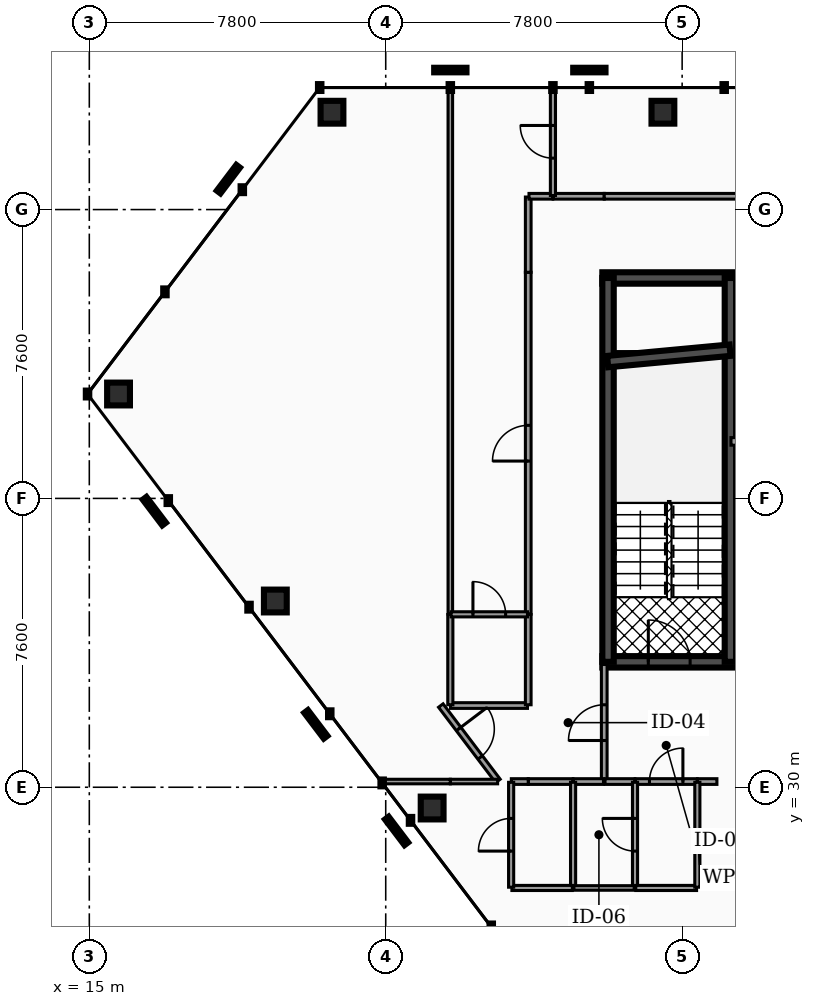
"""IFC4 building model, lengths in metres.
Left out: names, types, materials, properties, quantities, classifications, styles, units other than length and angle.
Written with IfcOpenShell. Run it as: python <this file> out.ifc"""

import sys

from ifc_helpers import new_model, si_unit, direction, frame, frame_2d, origin, origin_2d, place, context, subcontext, project, spatial, rectangle, hollow_rectangle, extrude, element, fill, save


model = new_model("IFC4")
c1 = context("Model", 3, precision=1e-05, world=origin(), true_north=direction((0.0, 1.0)))
c2 = subcontext(c1, "Body", "Model", "MODEL_VIEW")
j1 = project(units=[si_unit("LENGTHUNIT", "METRE"), si_unit("PLANEANGLEUNIT", "RADIAN")], contexts=[c1])
p1 = place(None, origin())
s1 = spatial("IfcSite", under=j1, at=p1, CompositionType="ELEMENT")
p2 = place(p1, origin())
s2 = spatial("IfcBuilding", under=s1, at=p2, CompositionType="ELEMENT")
p3 = place(p2, frame((0.0, 0.0, 208.76)))
s3 = spatial("IfcBuildingStorey", under=s2, at=p3, CompositionType="ELEMENT", Elevation=208.76)
p4 = place(p3, frame((28.5, 43.4, 0.0), z_axis=(0.0, 0.0, 1.0), x_axis=(1.0, 0.0, 0.0)))
e1 = element("IfcWall", 1, at=p4, inside=s3, PredefinedType="SHEAR", context=c2, shape_type="SweptSolid", body=[
    extrude(rectangle(XDim=19.86, YDim=0.3, at=frame_2d((9.93, 0.0))), origin(), (0.0, 0.0, 1.0), 3.18),
])
p5 = place(p3, frame((28.5, 33.3, 0.0), z_axis=(0.0, 0.0, 1.0), x_axis=(1.0, 0.0, 0.0)))
e2 = element("IfcWall", 2, at=p5, inside=s3, PredefinedType="SHEAR", context=c2, shape_type="SweptSolid", body=[
    extrude(rectangle(XDim=19.86, YDim=0.3, at=frame_2d((9.93, 0.0))), origin(), (0.0, 0.0, 1.0), 3.18),
])
p6 = place(p5, frame((3.93, 0.0, 0.0)))
e3 = element("IfcOpeningElement", 3, at=p6, cuts=e2, PredefinedType="OPENING", context=c2, shape_type="SweptSolid", body=[
    extrude(rectangle(XDim=1.1, YDim=2.15, at=frame_2d((0.55, 1.075))), frame((0.0, 0.16, 0.0), z_axis=(0.0, -1.0, 0.0), x_axis=(1.0, 0.0, 0.0)), (0.0, 0.0, 1.0), 0.32),
])
p7 = place(p5, frame((14.77, 0.0, 0.0)))
e4 = element("IfcOpeningElement", 4, at=p7, cuts=e2, PredefinedType="OPENING", context=c2, shape_type="SweptSolid", body=[
    extrude(rectangle(XDim=1.1, YDim=2.15, at=frame_2d((0.55, 1.075))), frame((0.0, 0.16, 0.0), z_axis=(0.0, -1.0, 0.0), x_axis=(1.0, 0.0, 0.0)), (0.0, 0.0, 1.0), 0.32),
])
p8 = place(p5, frame((11.25, 0.0, 0.0)))
e5 = element("IfcOpeningElement", 5, at=p8, cuts=e2, PredefinedType="OPENING", context=c2, shape_type="SweptSolid", body=[
    extrude(rectangle(XDim=1.0, YDim=2.1, at=frame_2d((0.5, 1.05))), frame((0.0, 0.16, 0.0), z_axis=(0.0, -1.0, 0.0), x_axis=(1.0, 0.0, 0.0)), (0.0, 0.0, 1.0), 0.32),
])
p9 = place(p5, frame((12.95, 0.0, 0.0)))
e6 = element("IfcOpeningElement", 6, at=p9, cuts=e2, PredefinedType="OPENING", context=c2, shape_type="SweptSolid", body=[
    extrude(rectangle(XDim=1.0, YDim=2.1, at=frame_2d((0.5, 1.05))), frame((0.0, 0.16, 0.0), z_axis=(0.0, -1.0, 0.0), x_axis=(1.0, 0.0, 0.0)), (0.0, 0.0, 1.0), 0.32),
])
p10 = place(p5, frame((5.85, 0.0, 0.0)))
e7 = element("IfcOpeningElement", 7, at=p10, cuts=e2, PredefinedType="OPENING", context=c2, shape_type="SweptSolid", body=[
    extrude(rectangle(XDim=1.0, YDim=2.1, at=frame_2d((0.5, 1.05))), frame((0.0, 0.16, 0.0), z_axis=(0.0, -1.0, 0.0), x_axis=(1.0, 0.0, 0.0)), (0.0, 0.0, 1.0), 0.32),
])
p11 = place(p5, frame((1.21, 0.0, 0.0)))
e8 = element("IfcOpeningElement", 8, at=p11, cuts=e2, PredefinedType="OPENING", context=c2, shape_type="SweptSolid", body=[
    extrude(rectangle(XDim=1.1, YDim=2.2, at=frame_2d((0.55, 1.1))), frame((0.0, 0.16, 0.0), z_axis=(0.0, -1.0, 0.0), x_axis=(1.0, 0.0, 0.0)), (0.0, 0.0, 1.0), 0.32),
])
p12 = place(p5, frame((9.34, 0.0, 0.0)))
e9 = element("IfcOpeningElement", 9, at=p12, cuts=e2, PredefinedType="OPENING", context=c2, shape_type="SweptSolid", body=[
    extrude(rectangle(XDim=1.12, YDim=2.05, at=frame_2d((0.56, 1.025))), frame((0.0, 0.16, 0.0), z_axis=(0.0, -1.0, 0.0), x_axis=(1.0, 0.0, 0.0)), (0.0, 0.0, 1.0), 0.32),
])
p13 = place(p5, frame((17.55, 0.0, 0.0)))
e10 = element("IfcOpeningElement", 10, at=p13, cuts=e2, PredefinedType="OPENING", context=c2, shape_type="SweptSolid", body=[
    extrude(rectangle(XDim=1.1, YDim=2.2, at=frame_2d((0.55, 1.1))), frame((0.0, 0.16, 0.0), z_axis=(0.0, -1.0, 0.0), x_axis=(1.0, 0.0, 0.0)), (0.0, 0.0, 1.0), 0.32),
])
for number, where, z_axis, x_axis in (
    (11, (28.65, 33.3, 0.0), (0.0, 0.0, 1.0), (0.0, 1.0, 0.0)),
    (12, (31.87, 33.3, 0.0), (0.0, 0.0, 1.0), (0.0, 1.0, 0.0)),
):
    element("IfcWall", number, at=place(p3, frame(where, z_axis=z_axis, x_axis=x_axis)), inside=s3, PredefinedType="SHEAR", context=c2, shape_type="SweptSolid", body=[
        extrude(rectangle(XDim=10.1, YDim=0.3, at=frame_2d((5.05, 0.0))), origin(), (0.0, 0.0, 1.0), 3.18),
    ])
p14 = place(p3, frame((28.64, 41.2, 0.0), z_axis=(0.0, 0.0, 1.0), x_axis=(0.995687118776, 0.092774789157, 0.0)))
e13 = element("IfcWall", 13, at=p14, inside=s3, PredefinedType="SHEAR", context=c2, shape_type="SweptSolid", body=[
    extrude(rectangle(XDim=3.234, YDim=0.3, at=frame_2d((1.617, 0.0))), origin(), (0.0, 0.0, 1.0), 3.18),
])
for number, where, z_axis, x_axis in (
    (14, (30.094, 47.761, 0.0), (0.0, 0.0, 1.0), (1.0, 0.0, 0.0)),
    (15, (21.386, 47.761, 0.0), (0.0, 0.0, 1.0), (1.0, 0.0, 0.0)),
    (16, (15.769, 40.347, 0.0), (0.0, 0.0, 1.0), (1.0, 0.0, 0.0)),
    (17, (19.895, 34.9, 0.0), (0.0, 0.0, 1.0), (1.0, 0.0, 0.0)),
    (18, (24.021, 29.454, 0.0), (0.0, 0.0, 1.0), (1.0, 0.0, 0.0)),
):
    element("IfcColumn", number, at=place(p3, frame(where, z_axis=z_axis, x_axis=x_axis)), inside=s3, PredefinedType="COLUMN", context=c2, shape_type="SweptSolid", body=[
        extrude(hollow_rectangle(XDim=0.6, YDim=0.6, WallThickness=0.03, at=origin_2d()), origin(), (0.0, 0.0, 1.0), 3.18),
    ])
p15 = place(p3, frame((31.885, 39.1, 0.0), z_axis=(0.0, 0.0, 1.0), x_axis=(1.0, 0.0, 0.0)))
e19 = element("IfcWall", 19, at=p15, inside=s3, PredefinedType="PARTITIONING", context=c2, shape_type="SweptSolid", body=[
    extrude(rectangle(XDim=5.645, YDim=0.2, at=frame_2d((2.823, 0.0))), origin(), (0.0, 0.0, 1.0), 2.235),
])
p16 = place(p3, frame((28.55, 30.17, 0.0), z_axis=(0.0, 0.0, 1.0), x_axis=(0.0, 1.0, 0.0)))
e20 = element("IfcWall", 20, at=p16, inside=s3, PredefinedType="PARTITIONING", context=c2, shape_type="SweptSolid", body=[
    extrude(rectangle(XDim=3.06, YDim=0.15, at=frame_2d((1.53, 0.0))), origin(), (0.0, 0.0, 1.0), 2.235),
])
p17 = place(p16, frame((1.06, 0.0, 0.0)))
e21 = element("IfcOpeningElement", 21, at=p17, cuts=e20, PredefinedType="OPENING", context=c2, shape_type="SweptSolid", body=[
    extrude(rectangle(XDim=0.94, YDim=2.05, at=frame_2d((0.47, 1.025))), frame((0.0, 0.085, 0.0), z_axis=(0.0, -1.0, 0.0), x_axis=(1.0, 0.0, 0.0)), (0.0, 0.0, 1.0), 0.17),
])
p18 = place(p3, frame((29.365, 30.15, 0.0), z_axis=(0.0, 0.0, 1.0), x_axis=(1.0, 0.0, 0.0)))
e22 = element("IfcWall", 22, at=p18, inside=s3, PredefinedType="PARTITIONING", context=c2, shape_type="SweptSolid", body=[
    extrude(rectangle(XDim=1.63, YDim=0.15, at=frame_2d((0.815, 0.0))), origin(), (0.0, 0.0, 1.0), 2.235),
])
p19 = place(p18, frame((0.375, 0.0, 0.0)))
e23 = element("IfcOpeningElement", 23, at=p19, cuts=e22, PredefinedType="OPENING", context=c2, shape_type="SweptSolid", body=[
    extrude(rectangle(XDim=0.88, YDim=2.05, at=frame_2d((0.44, 1.025))), frame((0.0, 0.085, 0.0), z_axis=(0.0, -1.0, 0.0), x_axis=(1.0, 0.0, 0.0)), (0.0, 0.0, 1.0), 0.17),
])
p20 = place(p3, frame((28.57, 30.15, 0.0), z_axis=(0.0, 0.0, 1.0), x_axis=(1.0, 0.0, 0.0)))
e24 = element("IfcWall", 24, at=p20, inside=s3, PredefinedType="PARTITIONING", context=c2, shape_type="SweptSolid", body=[
    extrude(rectangle(XDim=0.785, YDim=0.15, at=frame_2d((0.393, 0.0))), origin(), (0.0, 0.0, 1.0), 2.235),
])
p21 = place(p3, frame((31.005, 30.15, 0.0), z_axis=(0.0, 0.0, 1.0), x_axis=(1.0, 0.0, 0.0)))
e25 = element("IfcWall", 25, at=p21, inside=s3, PredefinedType="PARTITIONING", context=c2, shape_type="SweptSolid", body=[
    extrude(rectangle(XDim=0.51, YDim=0.15, at=frame_2d((0.255, 0.0))), origin(), (0.0, 0.0, 1.0), 2.235),
])
p22 = place(p3, frame((26.55, 30.15, 0.0), z_axis=(0.0, 0.0, 1.0), x_axis=(1.0, 0.0, 0.0)))
e26 = element("IfcWall", 26, at=p22, inside=s3, PredefinedType="PARTITIONING", context=c2, shape_type="SweptSolid", body=[
    extrude(rectangle(XDim=1.175, YDim=0.15, at=frame_2d((0.587, 0.0))), origin(), (0.0, 0.0, 1.0), 2.235),
])
p23 = place(p3, frame((26.105, 30.15, 0.0), z_axis=(0.0, 0.0, 1.0), x_axis=(1.0, 0.0, 0.0)))
e27 = element("IfcWall", 27, at=p23, inside=s3, PredefinedType="PARTITIONING", context=c2, shape_type="SweptSolid", body=[
    extrude(rectangle(XDim=0.445, YDim=0.15, at=frame_2d((0.223, 0.0))), origin(), (0.0, 0.0, 1.0), 2.235),
])
p24 = place(p3, frame((27.735, 30.15, 0.0), z_axis=(0.0, 0.0, 1.0), x_axis=(1.0, 0.0, 0.0)))
e28 = element("IfcWall", 28, at=p24, inside=s3, PredefinedType="PARTITIONING", context=c2, shape_type="SweptSolid", body=[
    extrude(rectangle(XDim=0.795, YDim=0.15, at=frame_2d((0.397, 0.0))), origin(), (0.0, 0.0, 1.0), 2.235),
])
p25 = place(p3, frame((24.25, 32.15, 0.0), z_axis=(0.0, 0.0, 1.0), x_axis=(0.60385391082, -0.797095009637, 0.0)))
e29 = element("IfcWall", 29, at=p25, inside=s3, PredefinedType="PARTITIONING", context=c2, shape_type="SweptSolid", body=[
    extrude(rectangle(XDim=2.489, YDim=0.15, at=frame_2d((1.245, 0.0))), origin(), (0.0, 0.0, 1.0), 2.235),
])
p26 = place(p25, frame((0.775, 0.0, 0.0)))
e30 = element("IfcOpeningElement", 30, at=p26, cuts=e29, PredefinedType="OPENING", context=c2, shape_type="SweptSolid", body=[
    extrude(rectangle(XDim=0.94, YDim=2.05, at=frame_2d((0.47, 1.025))), frame((0.0, 0.085, 0.0), z_axis=(0.0, -1.0, 0.0), x_axis=(1.0, 0.0, 0.0)), (0.0, 0.0, 1.0), 0.17),
])
p27 = place(p3, frame((26.55, 34.555, 0.0), z_axis=(0.0, 0.0, 1.0), x_axis=(0.0, 1.0, 0.0)))
e31 = element("IfcWall", 31, at=p27, inside=s3, PredefinedType="PARTITIONING", context=c2, shape_type="SweptSolid", body=[
    extrude(rectangle(XDim=8.995, YDim=0.15, at=frame_2d((4.498, 0.0))), origin(), (0.0, 0.0, 1.0), 2.235),
])
p28 = place(p27, frame((4.028, 0.0, 0.0)))
e32 = element("IfcOpeningElement", 32, at=p28, cuts=e31, PredefinedType="OPENING", context=c2, shape_type="SweptSolid", body=[
    extrude(rectangle(XDim=0.94, YDim=2.05, at=frame_2d((0.47, 1.025))), frame((0.0, 0.085, 0.0), z_axis=(0.0, -1.0, 0.0), x_axis=(1.0, 0.0, 0.0)), (0.0, 0.0, 1.0), 0.17),
])
p29 = place(p3, frame((26.55, 43.55, 0.0), z_axis=(0.0, 0.0, 1.0), x_axis=(0.0, 1.0, 0.0)))
e33 = element("IfcWall", 33, at=p29, inside=s3, PredefinedType="PARTITIONING", context=c2, shape_type="SweptSolid", body=[
    extrude(rectangle(XDim=1.98, YDim=0.15, at=frame_2d((0.99, 0.0))), origin(), (0.0, 0.0, 1.0), 2.235),
])
p30 = place(p3, frame((26.57, 45.55, 0.0), z_axis=(0.0, 0.0, 1.0), x_axis=(1.0, 0.0, 0.0)))
e34 = element("IfcWall", 34, at=p30, inside=s3, PredefinedType="PARTITIONING", context=c2, shape_type="SweptSolid", body=[
    extrude(rectangle(XDim=0.625, YDim=0.15, at=frame_2d((0.312, 0.0))), origin(), (0.0, 0.0, 1.0), 2.235),
])
p31 = place(p3, frame((27.205, 45.55, 0.0), z_axis=(0.0, 0.0, 1.0), x_axis=(1.0, 0.0, 0.0)))
e35 = element("IfcWall", 35, at=p31, inside=s3, PredefinedType="PARTITIONING", context=c2, shape_type="SweptSolid", body=[
    extrude(rectangle(XDim=1.345, YDim=0.15, at=frame_2d((0.672, 0.0))), origin(), (0.0, 0.0, 1.0), 2.235),
])
p32 = place(p3, frame((28.55, 45.55, 0.0), z_axis=(0.0, 0.0, 1.0), x_axis=(1.0, 0.0, 0.0)))
e36 = element("IfcWall", 36, at=p32, inside=s3, PredefinedType="PARTITIONING", context=c2, shape_type="SweptSolid", body=[
    extrude(rectangle(XDim=4.945, YDim=0.15, at=frame_2d((2.473, 0.0))), origin(), (0.0, 0.0, 1.0), 2.235),
])
p33 = place(p3, frame((24.505, 32.15, 0.0), z_axis=(0.0, 0.0, 1.0), x_axis=(1.0, 0.0, 0.0)))
e37 = element("IfcWall", 37, at=p33, inside=s3, PredefinedType="PARTITIONING", context=c2, shape_type="SweptSolid", body=[
    extrude(rectangle(XDim=2.025, YDim=0.15, at=frame_2d((1.013, 0.0))), origin(), (0.0, 0.0, 1.0), 2.235),
])
p34 = place(p3, frame((26.55, 32.17, 0.0), z_axis=(0.0, 0.0, 1.0), x_axis=(0.0, 1.0, 0.0)))
e38 = element("IfcWall", 38, at=p34, inside=s3, PredefinedType="PARTITIONING", context=c2, shape_type="SweptSolid", body=[
    extrude(rectangle(XDim=2.375, YDim=0.15, at=frame_2d((1.188, 0.0))), origin(), (0.0, 0.0, 1.0), 2.235),
])
p35 = place(p3, frame((29.36, 27.37, 0.0), z_axis=(0.0, 0.0, 1.0), x_axis=(0.0, 1.0, 0.0)))
e39 = element("IfcWall", 39, at=p35, inside=s3, PredefinedType="PARTITIONING", context=c2, shape_type="SweptSolid", body=[
    extrude(rectangle(XDim=2.76, YDim=0.135, at=frame_2d((1.38, 0.0))), origin(), (0.0, 0.0, 1.0), 2.235),
])
p36 = place(p35, frame((0.95, 0.0, 0.0)))
e40 = element("IfcOpeningElement", 40, at=p36, cuts=e39, PredefinedType="OPENING", context=c2, shape_type="SweptSolid", body=[
    extrude(rectangle(XDim=0.86, YDim=2.05, at=frame_2d((0.43, 1.025))), frame((0.0, 0.077, 0.0), z_axis=(0.0, -1.0, 0.0), x_axis=(1.0, 0.0, 0.0)), (0.0, 0.0, 1.0), 0.155),
])
p37 = place(p3, frame((29.38, 27.35, 0.0), z_axis=(0.0, 0.0, 1.0), x_axis=(1.0, 0.0, 0.0)))
e41 = element("IfcWall", 41, at=p37, inside=s3, PredefinedType="PARTITIONING", context=c2, shape_type="SweptSolid", body=[
    extrude(rectangle(XDim=1.6, YDim=0.135, at=frame_2d((0.8, 0.0))), origin(), (0.0, 0.0, 1.0), 2.235),
])
for number, where, z_axis, x_axis in (
    (42, (31.0, 27.37, 0.0), (0.0, 0.0, 1.0), (0.0, 1.0, 0.0)),
    (43, (27.73, 27.37, 0.0), (0.0, 0.0, 1.0), (0.0, 1.0, 0.0)),
):
    element("IfcWall", number, at=place(p3, frame(where, z_axis=z_axis, x_axis=x_axis)), inside=s3, PredefinedType="PARTITIONING", context=c2, shape_type="SweptSolid", body=[
        extrude(rectangle(XDim=2.76, YDim=0.135, at=frame_2d((1.38, 0.0))), origin(), (0.0, 0.0, 1.0), 2.235),
    ])
p38 = place(p3, frame((26.12, 27.35, 0.0), z_axis=(0.0, 0.0, 1.0), x_axis=(1.0, 0.0, 0.0)))
e44 = element("IfcWall", 44, at=p38, inside=s3, PredefinedType="PARTITIONING", context=c2, shape_type="SweptSolid", body=[
    extrude(rectangle(XDim=1.59, YDim=0.135, at=frame_2d((0.795, 0.0))), origin(), (0.0, 0.0, 1.0), 2.235),
])
p39 = place(p3, frame((26.1, 27.37, 0.0), z_axis=(0.0, 0.0, 1.0), x_axis=(0.0, 1.0, 0.0)))
e45 = element("IfcWall", 45, at=p39, inside=s3, PredefinedType="PARTITIONING", context=c2, shape_type="SweptSolid", body=[
    extrude(rectangle(XDim=2.76, YDim=0.135, at=frame_2d((1.38, 0.0))), origin(), (0.0, 0.0, 1.0), 2.235),
])
p40 = place(p39, frame((0.95, 0.0, 0.0)))
e46 = element("IfcOpeningElement", 46, at=p40, cuts=e45, PredefinedType="OPENING", context=c2, shape_type="SweptSolid", body=[
    extrude(rectangle(XDim=0.86, YDim=2.05, at=frame_2d((0.43, 1.025))), frame((0.0, 0.077, 0.0), z_axis=(0.0, -1.0, 0.0), x_axis=(1.0, 0.0, 0.0)), (0.0, 0.0, 1.0), 0.155),
])
p41 = place(p3, frame((27.75, 27.35, 0.0), z_axis=(0.0, 0.0, 1.0), x_axis=(1.0, 0.0, 0.0)))
e47 = element("IfcWall", 47, at=p41, inside=s3, PredefinedType="PARTITIONING", context=c2, shape_type="SweptSolid", body=[
    extrude(rectangle(XDim=1.59, YDim=0.12, at=frame_2d((0.795, 0.0))), origin(), (0.0, 0.0, 1.0), 2.235),
])
p42 = place(p3, frame((24.5, 30.15, 0.0), z_axis=(0.0, 0.0, 1.0), x_axis=(1.0, 0.0, 0.0)))
e48 = element("IfcWall", 48, at=p42, inside=s3, PredefinedType="PARTITIONING", context=c2, shape_type="SweptSolid", body=[
    extrude(rectangle(XDim=1.245, YDim=0.12, at=frame_2d((0.623, 0.0))), origin(), (0.0, 0.0, 1.0), 2.235),
])
p43 = place(p3, frame((22.694, 30.15, 0.0), z_axis=(0.0, 0.0, 1.0), x_axis=(1.0, 0.0, 0.0)))
e49 = element("IfcWall", 49, at=p43, inside=s3, PredefinedType="PARTITIONING", context=c2, shape_type="SweptSolid", body=[
    extrude(rectangle(XDim=1.806, YDim=0.12, at=frame_2d((0.903, 0.0))), origin(), (0.0, 0.0, 1.0), 2.235),
])
p44 = place(p3, frame((24.5, 34.555, 0.0), z_axis=(0.0, 0.0, 1.0), x_axis=(0.0, 1.0, 0.0)))
e50 = element("IfcWall", 50, at=p44, inside=s3, PredefinedType="PARTITIONING", context=c2, shape_type="SweptSolid", body=[
    extrude(rectangle(XDim=13.841, YDim=0.12, at=frame_2d((6.92, 0.0))), origin(), (0.0, 0.0, 1.0), 2.235),
])
p45 = place(p3, frame((24.5, 32.17, 0.0), z_axis=(0.0, 0.0, 1.0), x_axis=(0.0, 1.0, 0.0)))
e51 = element("IfcWall", 51, at=p45, inside=s3, PredefinedType="PARTITIONING", context=c2, shape_type="SweptSolid", body=[
    extrude(rectangle(XDim=2.375, YDim=0.135, at=frame_2d((1.188, 0.0))), origin(), (0.0, 0.0, 1.0), 2.235),
])
p46 = place(p3, frame((27.2, 45.57, 0.0), z_axis=(0.0, 0.0, 1.0), x_axis=(0.0, 1.0, 0.0)))
e52 = element("IfcWall", 52, at=p46, inside=s3, PredefinedType="PARTITIONING", context=c2, shape_type="SweptSolid", body=[
    extrude(rectangle(XDim=2.826, YDim=0.135, at=frame_2d((1.413, 0.0))), origin(), (0.0, 0.0, 1.0), 2.235),
])
p47 = place(p46, frame((0.983, 0.0, 0.0)))
e53 = element("IfcOpeningElement", 53, at=p47, cuts=e52, PredefinedType="OPENING", context=c2, shape_type="SweptSolid", body=[
    extrude(rectangle(XDim=0.86, YDim=2.05, at=frame_2d((0.43, 1.025))), frame((0.0, 0.077, 0.0), z_axis=(0.0, -1.0, 0.0), x_axis=(1.0, 0.0, 0.0)), (0.0, 0.0, 1.0), 0.155),
])
p48 = place(p3, frame((24.52, 34.55, 0.0), z_axis=(0.0, 0.0, 1.0), x_axis=(1.0, 0.0, 0.0)))
e54 = element("IfcWall", 54, at=p48, inside=s3, PredefinedType="PARTITIONING", context=c2, shape_type="SweptSolid", body=[
    extrude(rectangle(XDim=2.01, YDim=0.135, at=frame_2d((1.005, 0.0))), origin(), (0.0, 0.0, 1.0), 2.235),
])
p49 = place(p48, frame((0.575, 0.0, 0.0)))
e55 = element("IfcOpeningElement", 55, at=p49, cuts=e54, PredefinedType="OPENING", context=c2, shape_type="SweptSolid", body=[
    extrude(rectangle(XDim=0.86, YDim=2.05, at=frame_2d((0.43, 1.025))), frame((0.0, 0.077, 0.0), z_axis=(0.0, -1.0, 0.0), x_axis=(1.0, 0.0, 0.0)), (0.0, 0.0, 1.0), 0.155),
])
p50 = place(p11, origin())
e56 = element("IfcDoor", 56, at=p50, inside=s3, OperationType="SINGLE_SWING_LEFT", PredefinedType="DOOR", context=c2, shape_type="SweptSolid", body=[
    extrude(rectangle(XDim=1.1, YDim=2.2, at=frame_2d((0.55, 1.1))), frame((0.0, 0.025, 0.0), z_axis=(0.0, -1.0, 0.0), x_axis=(1.0, 0.0, 0.0)), (0.0, 0.0, 1.0), 0.05),
])
fill(e8, e56)
p51 = place(p17, origin())
e57 = element("IfcDoor", 57, at=p51, inside=s3, OperationType="SINGLE_SWING_LEFT", PredefinedType="DOOR", context=c2, shape_type="SweptSolid", body=[
    extrude(rectangle(XDim=0.94, YDim=2.05, at=frame_2d((0.47, 1.025))), frame((0.0, 0.025, 0.0), z_axis=(0.0, -1.0, 0.0), x_axis=(1.0, 0.0, 0.0)), (0.0, 0.0, 1.0), 0.05),
])
fill(e21, e57)
p52 = place(p19, origin())
e58 = element("IfcDoor", 58, at=p52, inside=s3, OperationType="SINGLE_SWING_RIGHT", PredefinedType="DOOR", context=c2, shape_type="SweptSolid", body=[
    extrude(rectangle(XDim=0.88, YDim=2.05, at=frame_2d((0.44, 1.025))), frame((0.0, 0.025, 0.0), z_axis=(0.0, -1.0, 0.0), x_axis=(1.0, 0.0, 0.0)), (0.0, 0.0, 1.0), 0.05),
])
fill(e23, e58)
p53 = place(p26, origin())
e59 = element("IfcDoor", 59, at=p53, inside=s3, OperationType="SINGLE_SWING_LEFT", PredefinedType="DOOR", context=c2, shape_type="SweptSolid", body=[
    extrude(rectangle(XDim=0.94, YDim=2.05, at=frame_2d((0.47, 1.025))), frame((0.0, 0.025, 0.0), z_axis=(0.0, -1.0, 0.0), x_axis=(1.0, 0.0, 0.0)), (0.0, 0.0, 1.0), 0.05),
])
fill(e30, e59)
p54 = place(p28, origin())
e60 = element("IfcDoor", 60, at=p54, inside=s3, OperationType="SINGLE_SWING_LEFT", PredefinedType="DOOR", context=c2, shape_type="SweptSolid", body=[
    extrude(rectangle(XDim=0.94, YDim=2.05, at=frame_2d((0.47, 1.025))), frame((0.0, 0.025, 0.0), z_axis=(0.0, -1.0, 0.0), x_axis=(1.0, 0.0, 0.0)), (0.0, 0.0, 1.0), 0.05),
])
fill(e32, e60)
p55 = place(p36, origin())
e61 = element("IfcDoor", 61, at=p55, inside=s3, OperationType="SINGLE_SWING_RIGHT", PredefinedType="DOOR", context=c2, shape_type="SweptSolid", body=[
    extrude(rectangle(XDim=0.86, YDim=2.05, at=frame_2d((0.43, 1.025))), frame((0.0, 0.025, 0.0), z_axis=(0.0, -1.0, 0.0), x_axis=(1.0, 0.0, 0.0)), (0.0, 0.0, 1.0), 0.05),
])
fill(e40, e61)
p56 = place(p40, origin())
e62 = element("IfcDoor", 62, at=p56, inside=s3, OperationType="SINGLE_SWING_LEFT", PredefinedType="DOOR", context=c2, shape_type="SweptSolid", body=[
    extrude(rectangle(XDim=0.86, YDim=2.05, at=frame_2d((0.43, 1.025))), frame((0.0, 0.025, 0.0), z_axis=(0.0, -1.0, 0.0), x_axis=(1.0, 0.0, 0.0)), (0.0, 0.0, 1.0), 0.05),
])
fill(e46, e62)
p57 = place(p47, origin())
e63 = element("IfcDoor", 63, at=p57, inside=s3, OperationType="SINGLE_SWING_RIGHT", PredefinedType="DOOR", context=c2, shape_type="SweptSolid", body=[
    extrude(rectangle(XDim=0.86, YDim=2.05, at=frame_2d((0.43, 1.025))), frame((0.0, 0.025, 0.0), z_axis=(0.0, -1.0, 0.0), x_axis=(1.0, 0.0, 0.0)), (0.0, 0.0, 1.0), 0.05),
])
fill(e53, e63)
p58 = place(p49, origin())
e64 = element("IfcDoor", 64, at=p58, inside=s3, OperationType="SINGLE_SWING_LEFT", PredefinedType="DOOR", context=c2, shape_type="SweptSolid", body=[
    extrude(rectangle(XDim=0.86, YDim=2.05, at=frame_2d((0.43, 1.025))), frame((0.0, 0.025, 0.0), z_axis=(0.0, -1.0, 0.0), x_axis=(1.0, 0.0, 0.0)), (0.0, 0.0, 1.0), 0.05),
])
fill(e55, e64)
save(model, sys.argv[1])
